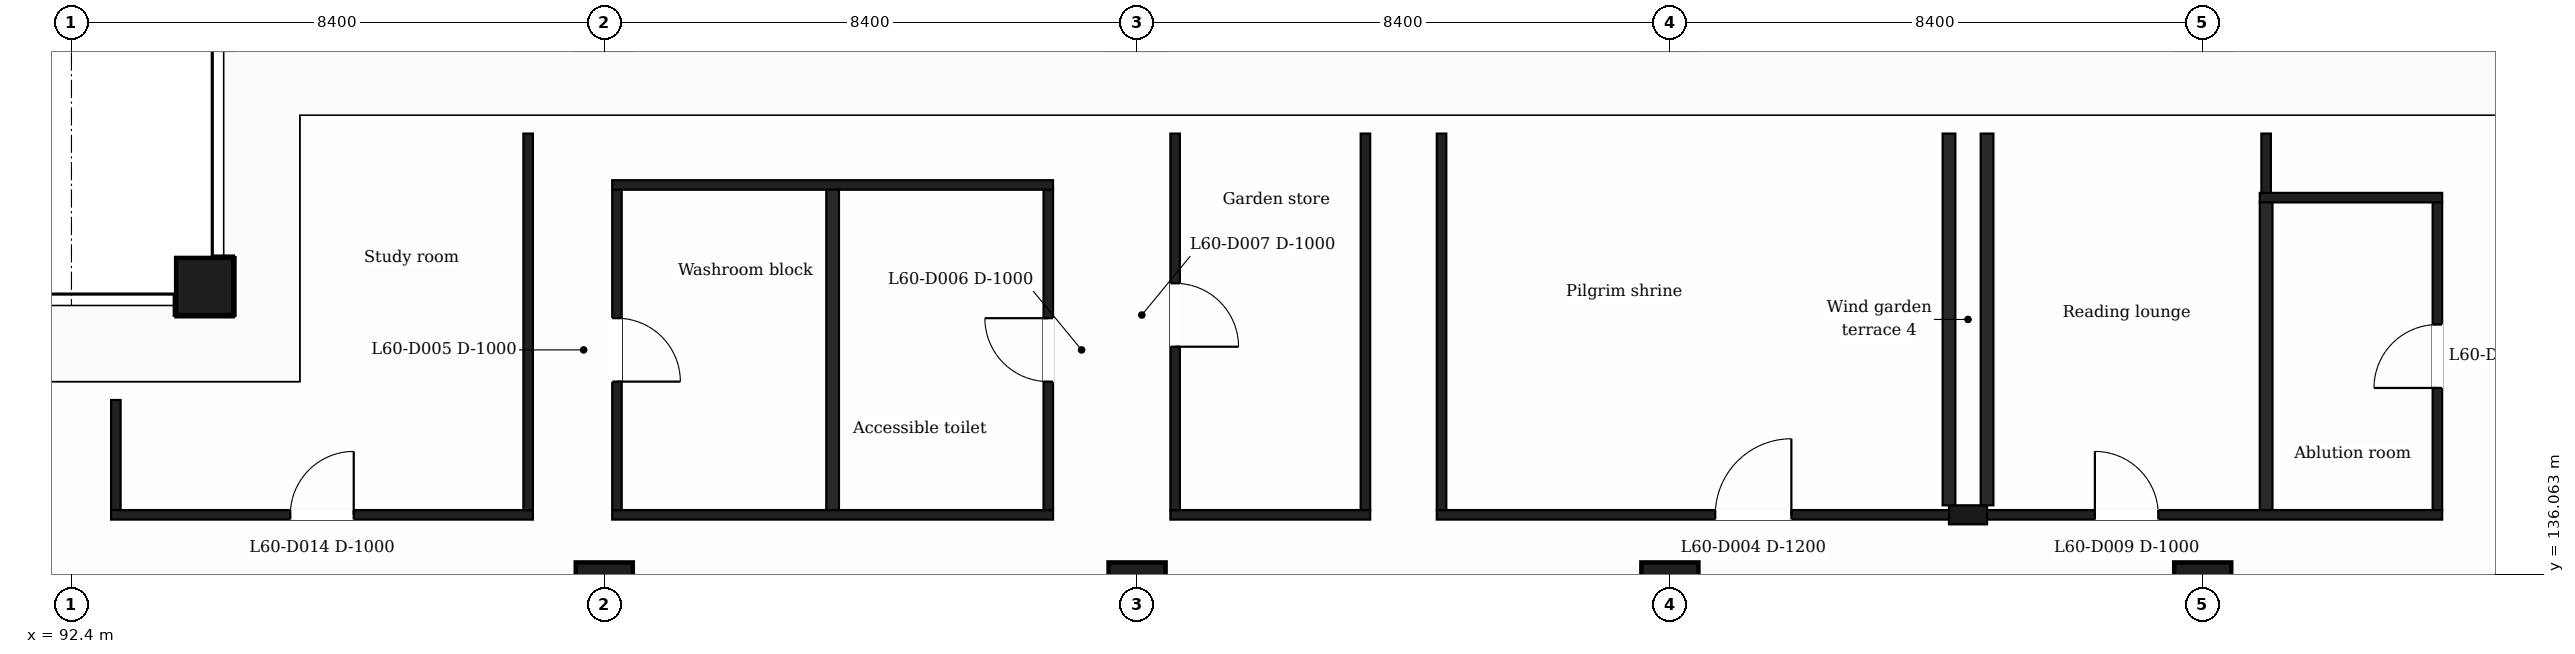
"""IFC4 building model, lengths in metres.
Left out: names, types, materials, properties, quantities, classifications, styles, units other than length and angle.
Written with IfcOpenShell. Run it as: python <this file> out.ifc"""

import sys

from ifc_helpers import new_model, si_unit, direction, frame, frame_2d, origin, origin_2d, place, context, subcontext, project, spatial, rectangle, extrude, element, fill, save


model = new_model("IFC4")
c1 = context("Model", 3, precision=1e-05, world=origin(), true_north=direction((0.0, 1.0)))
c2 = subcontext(c1, "Body", "Model", "MODEL_VIEW")
j1 = project(units=[si_unit("LENGTHUNIT", "METRE"), si_unit("PLANEANGLEUNIT", "RADIAN")], contexts=[c1])
p1 = place(None, origin())
s1 = spatial("IfcSite", under=j1, at=p1, CompositionType="ELEMENT")
p2 = place(p1, origin())
s2 = spatial("IfcBuilding", under=s1, at=p2, CompositionType="ELEMENT")
p3 = place(p2, frame((0.0, 0.0, 246.6)))
s3 = spatial("IfcBuildingStorey", under=s2, at=p3, CompositionType="ELEMENT", Elevation=246.6)
for number, where, z_axis, x_axis in (
    (1, (94.5, 140.6, 0.0), (0.0, 0.0, 1.0), (1.0, 0.0, 0.0)),
    (2, (100.8, 135.8, 0.0), (0.0, 0.0, 1.0), (1.0, 0.0, 0.0)),
    (3, (109.2, 135.8, 0.0), (0.0, 0.0, 1.0), (1.0, 0.0, 0.0)),
    (4, (117.6, 135.8, 0.0), (0.0, 0.0, 1.0), (1.0, 0.0, 0.0)),
    (5, (126.0, 135.8, 0.0), (0.0, 0.0, 1.0), (1.0, 0.0, 0.0)),
):
    element("IfcColumn", number, at=place(p3, frame(where, z_axis=z_axis, x_axis=x_axis)), inside=s3, PredefinedType="COLUMN", context=c2, shape_type="SweptSolid", body=[
        extrude(rectangle(XDim=0.9, YDim=0.9, at=origin_2d()), origin(), (0.0, 0.0, 1.0), 7.4),
    ])
p4 = place(p3, frame((122.0, 137.0, 0.0), z_axis=(0.0, 0.0, 1.0), x_axis=(1.0, 0.0, 0.0)))
e6 = element("IfcWall", 6, at=p4, inside=s3, PredefinedType="PARTITIONING", context=c2, shape_type="SweptSolid", body=[
    extrude(rectangle(XDim=0.6, YDim=0.3, at=frame_2d((0.3, 0.0))), origin(), (0.0, 0.0, 1.0), 1.0),
])
p5 = place(p3, frame((93.025, 137.0, 0.0), z_axis=(0.0, 0.0, 1.0), x_axis=(1.0, 0.0, 0.0)))
e7 = element("IfcWall", 7, at=p5, inside=s3, PredefinedType="PARTITIONING", context=c2, shape_type="SweptSolid", body=[
    extrude(rectangle(XDim=6.65, YDim=0.15, at=frame_2d((3.325, 0.0))), origin(), (0.0, 0.0, 1.0), 6.9),
])
p6 = place(p5, frame((2.825, 0.0, 0.0)))
e8 = element("IfcOpeningElement", 8, at=p6, cuts=e7, PredefinedType="OPENING", context=c2, shape_type="SweptSolid", body=[
    extrude(rectangle(XDim=1.0, YDim=2.1, at=frame_2d((0.5, 1.05))), frame((0.0, 0.085, 0.0), z_axis=(0.0, -1.0, 0.0), x_axis=(1.0, 0.0, 0.0)), (0.0, 0.0, 1.0), 0.17),
])
p7 = place(p3, frame((100.925, 137.0, 0.0), z_axis=(0.0, 0.0, 1.0), x_axis=(1.0, 0.0, 0.0)))
e9 = element("IfcWall", 9, at=p7, inside=s3, PredefinedType="PARTITIONING", context=c2, shape_type="SweptSolid", body=[
    extrude(rectangle(XDim=6.95, YDim=0.15, at=frame_2d((3.475, 0.0))), origin(), (0.0, 0.0, 1.0), 6.9),
])
p8 = place(p3, frame((109.725, 137.0, 0.0), z_axis=(0.0, 0.0, 1.0), x_axis=(1.0, 0.0, 0.0)))
e10 = element("IfcWall", 10, at=p8, inside=s3, PredefinedType="PARTITIONING", context=c2, shape_type="SweptSolid", body=[
    extrude(rectangle(XDim=3.15, YDim=0.15, at=frame_2d((1.575, 0.0))), origin(), (0.0, 0.0, 1.0), 6.9),
])
p9 = place(p3, frame((113.925, 137.0, 0.0), z_axis=(0.0, 0.0, 1.0), x_axis=(1.0, 0.0, 0.0)))
e11 = element("IfcWall", 11, at=p9, inside=s3, PredefinedType="PARTITIONING", context=c2, shape_type="SweptSolid", body=[
    extrude(rectangle(XDim=8.075, YDim=0.15, at=frame_2d((4.038, 0.0))), origin(), (0.0, 0.0, 1.0), 6.9),
])
p10 = place(p9, frame((4.39, 0.0, 0.0)))
e12 = element("IfcOpeningElement", 12, at=p10, cuts=e11, PredefinedType="OPENING", context=c2, shape_type="SweptSolid", body=[
    extrude(rectangle(XDim=1.2, YDim=2.1, at=frame_2d((0.6, 1.05))), frame((0.0, 0.085, 0.0), z_axis=(0.0, -1.0, 0.0), x_axis=(1.0, 0.0, 0.0)), (0.0, 0.0, 1.0), 0.17),
])
p11 = place(p3, frame((122.6, 137.0, 0.0), z_axis=(0.0, 0.0, 1.0), x_axis=(1.0, 0.0, 0.0)))
e13 = element("IfcWall", 13, at=p11, inside=s3, PredefinedType="PARTITIONING", context=c2, shape_type="SweptSolid", body=[
    extrude(rectangle(XDim=7.175, YDim=0.15, at=frame_2d((3.587, 0.0))), origin(), (0.0, 0.0, 1.0), 6.9),
])
p12 = place(p11, frame((1.7, 0.0, 0.0)))
e14 = element("IfcOpeningElement", 14, at=p12, cuts=e13, PredefinedType="OPENING", context=c2, shape_type="SweptSolid", body=[
    extrude(rectangle(XDim=1.0, YDim=2.1, at=frame_2d((0.5, 1.05))), frame((0.0, 0.085, 0.0), z_axis=(0.0, -1.0, 0.0), x_axis=(1.0, 0.0, 0.0)), (0.0, 0.0, 1.0), 0.17),
])
p13 = place(p3, frame((126.9, 142.0, 0.0), z_axis=(0.0, 0.0, 1.0), x_axis=(1.0, 0.0, 0.0)))
e15 = element("IfcWall", 15, at=p13, inside=s3, PredefinedType="PARTITIONING", context=c2, shape_type="SweptSolid", body=[
    extrude(rectangle(XDim=2.875, YDim=0.15, at=frame_2d((1.438, 0.0))), origin(), (0.0, 0.0, 1.0), 6.9),
])
p14 = place(p3, frame((100.925, 142.2, 0.0), z_axis=(0.0, 0.0, 1.0), x_axis=(1.0, 0.0, 0.0)))
e16 = element("IfcWall", 16, at=p14, inside=s3, PredefinedType="PARTITIONING", context=c2, shape_type="SweptSolid", body=[
    extrude(rectangle(XDim=6.95, YDim=0.15, at=frame_2d((3.475, 0.0))), origin(), (0.0, 0.0, 1.0), 6.9),
])
p15 = place(p3, frame((93.1, 137.075, 0.0), z_axis=(0.0, 0.0, 1.0), x_axis=(0.0, 1.0, 0.0)))
e17 = element("IfcWall", 17, at=p15, inside=s3, PredefinedType="PARTITIONING", context=c2, shape_type="SweptSolid", body=[
    extrude(rectangle(XDim=1.735, YDim=0.15, at=frame_2d((0.868, 0.0))), origin(), (0.0, 0.0, 1.0), 6.9),
])
p16 = place(p3, frame((99.6, 137.075, 0.0), z_axis=(0.0, 0.0, 1.0), x_axis=(0.0, 1.0, 0.0)))
e18 = element("IfcWall", 18, at=p16, inside=s3, PredefinedType="PARTITIONING", context=c2, shape_type="SweptSolid", body=[
    extrude(rectangle(XDim=5.935, YDim=0.15, at=frame_2d((2.968, 0.0))), origin(), (0.0, 0.0, 1.0), 6.9),
])
p17 = place(p3, frame((101.0, 137.075, 0.0), z_axis=(0.0, 0.0, 1.0), x_axis=(0.0, 1.0, 0.0)))
e19 = element("IfcWall", 19, at=p17, inside=s3, PredefinedType="PARTITIONING", context=c2, shape_type="SweptSolid", body=[
    extrude(rectangle(XDim=5.05, YDim=0.15, at=frame_2d((2.525, 0.0))), origin(), (0.0, 0.0, 1.0), 6.9),
])
p18 = place(p17, frame((2.025, 0.0, 0.0)))
e20 = element("IfcOpeningElement", 20, at=p18, cuts=e19, PredefinedType="OPENING", context=c2, shape_type="SweptSolid", body=[
    extrude(rectangle(XDim=1.0, YDim=2.1, at=frame_2d((0.5, 1.05))), frame((0.0, 0.085, 0.0), z_axis=(0.0, -1.0, 0.0), x_axis=(1.0, 0.0, 0.0)), (0.0, 0.0, 1.0), 0.17),
])
p19 = place(p3, frame((104.4, 137.075, 0.0), z_axis=(0.0, 0.0, 1.0), x_axis=(0.0, 1.0, 0.0)))
e21 = element("IfcWall", 21, at=p19, inside=s3, PredefinedType="PARTITIONING", context=c2, shape_type="SweptSolid", body=[
    extrude(rectangle(XDim=5.05, YDim=0.2, at=frame_2d((2.525, 0.0))), origin(), (0.0, 0.0, 1.0), 6.9),
])
p20 = place(p3, frame((107.8, 137.075, 0.0), z_axis=(0.0, 0.0, 1.0), x_axis=(0.0, 1.0, 0.0)))
e22 = element("IfcWall", 22, at=p20, inside=s3, PredefinedType="PARTITIONING", context=c2, shape_type="SweptSolid", body=[
    extrude(rectangle(XDim=5.05, YDim=0.15, at=frame_2d((2.525, 0.0))), origin(), (0.0, 0.0, 1.0), 6.9),
])
p21 = place(p20, frame((2.025, 0.0, 0.0)))
e23 = element("IfcOpeningElement", 23, at=p21, cuts=e22, PredefinedType="OPENING", context=c2, shape_type="SweptSolid", body=[
    extrude(rectangle(XDim=1.0, YDim=2.1, at=frame_2d((0.5, 1.05))), frame((0.0, 0.085, 0.0), z_axis=(0.0, -1.0, 0.0), x_axis=(1.0, 0.0, 0.0)), (0.0, 0.0, 1.0), 0.17),
])
p22 = place(p3, frame((109.8, 137.075, 0.0), z_axis=(0.0, 0.0, 1.0), x_axis=(0.0, 1.0, 0.0)))
e24 = element("IfcWall", 24, at=p22, inside=s3, PredefinedType="PARTITIONING", context=c2, shape_type="SweptSolid", body=[
    extrude(rectangle(XDim=5.935, YDim=0.15, at=frame_2d((2.968, 0.0))), origin(), (0.0, 0.0, 1.0), 6.9),
])
p23 = place(p22, frame((2.575, 0.0, 0.0)))
e25 = element("IfcOpeningElement", 25, at=p23, cuts=e24, PredefinedType="OPENING", context=c2, shape_type="SweptSolid", body=[
    extrude(rectangle(XDim=1.0, YDim=2.1, at=frame_2d((0.5, 1.05))), frame((0.0, 0.085, 0.0), z_axis=(0.0, -1.0, 0.0), x_axis=(1.0, 0.0, 0.0)), (0.0, 0.0, 1.0), 0.17),
])
for number, where, z_axis, x_axis in (
    (26, (112.8, 137.075, 0.0), (0.0, 0.0, 1.0), (0.0, 1.0, 0.0)),
    (27, (114.0, 137.075, 0.0), (0.0, 0.0, 1.0), (0.0, 1.0, 0.0)),
):
    element("IfcWall", number, at=place(p3, frame(where, z_axis=z_axis, x_axis=x_axis)), inside=s3, PredefinedType="PARTITIONING", context=c2, shape_type="SweptSolid", body=[
        extrude(rectangle(XDim=5.935, YDim=0.15, at=frame_2d((2.968, 0.0))), origin(), (0.0, 0.0, 1.0), 6.9),
    ])
for number, where, z_axis, x_axis in (
    (28, (122.0, 137.15, 0.0), (0.0, 0.0, 1.0), (0.0, 1.0, 0.0)),
    (29, (122.6, 137.15, 0.0), (0.0, 0.0, 1.0), (0.0, 1.0, 0.0)),
):
    element("IfcWall", number, at=place(p3, frame(where, z_axis=z_axis, x_axis=x_axis)), inside=s3, PredefinedType="PARTITIONING", context=c2, shape_type="SweptSolid", body=[
        extrude(rectangle(XDim=5.86, YDim=0.2, at=frame_2d((2.93, 0.0))), origin(), (0.0, 0.0, 1.0), 6.9),
    ])
p24 = place(p3, frame((127.0, 137.075, 0.0), z_axis=(0.0, 0.0, 1.0), x_axis=(0.0, 1.0, 0.0)))
e30 = element("IfcWall", 30, at=p24, inside=s3, PredefinedType="PARTITIONING", context=c2, shape_type="SweptSolid", body=[
    extrude(rectangle(XDim=4.85, YDim=0.2, at=frame_2d((2.425, 0.0))), origin(), (0.0, 0.0, 1.0), 6.9),
])
p25 = place(p3, frame((127.0, 142.075, 0.0), z_axis=(0.0, 0.0, 1.0), x_axis=(0.0, 1.0, 0.0)))
e31 = element("IfcWall", 31, at=p25, inside=s3, PredefinedType="PARTITIONING", context=c2, shape_type="SweptSolid", body=[
    extrude(rectangle(XDim=0.935, YDim=0.15, at=frame_2d((0.468, 0.0))), origin(), (0.0, 0.0, 1.0), 6.9),
])
p26 = place(p3, frame((129.7, 137.075, 0.0), z_axis=(0.0, 0.0, 1.0), x_axis=(0.0, 1.0, 0.0)))
e32 = element("IfcWall", 32, at=p26, inside=s3, PredefinedType="PARTITIONING", context=c2, shape_type="SweptSolid", body=[
    extrude(rectangle(XDim=4.85, YDim=0.15, at=frame_2d((2.425, 0.0))), origin(), (0.0, 0.0, 1.0), 6.9),
])
p27 = place(p26, frame((1.925, 0.0, 0.0)))
e33 = element("IfcOpeningElement", 33, at=p27, cuts=e32, PredefinedType="OPENING", context=c2, shape_type="SweptSolid", body=[
    extrude(rectangle(XDim=1.0, YDim=2.1, at=frame_2d((0.5, 1.05))), frame((0.0, 0.085, 0.0), z_axis=(0.0, -1.0, 0.0), x_axis=(1.0, 0.0, 0.0)), (0.0, 0.0, 1.0), 0.17),
])
p28 = place(p10, origin())
e34 = element("IfcDoor", 34, at=p28, inside=s3, OperationType="SINGLE_SWING_RIGHT", PredefinedType="DOOR", context=c2, shape_type="SweptSolid", body=[
    extrude(rectangle(XDim=1.2, YDim=2.1, at=frame_2d((0.6, 1.05))), frame((0.0, 0.025, 0.0), z_axis=(0.0, -1.0, 0.0), x_axis=(1.0, 0.0, 0.0)), (0.0, 0.0, 1.0), 0.05),
])
fill(e12, e34)
p29 = place(p18, origin())
e35 = element("IfcDoor", 35, at=p29, inside=s3, OperationType="SINGLE_SWING_LEFT", PredefinedType="DOOR", context=c2, shape_type="SweptSolid", body=[
    extrude(rectangle(XDim=1.0, YDim=2.1, at=frame_2d((0.5, 1.05))), frame((0.0, 0.025, 0.0), z_axis=(0.0, -1.0, 0.0), x_axis=(1.0, 0.0, 0.0)), (0.0, 0.0, 1.0), 0.05),
])
fill(e20, e35)
p30 = place(p21, origin())
e36 = element("IfcDoor", 36, at=p30, inside=s3, OperationType="SINGLE_SWING_RIGHT", PredefinedType="DOOR", context=c2, shape_type="SweptSolid", body=[
    extrude(rectangle(XDim=1.0, YDim=2.1, at=frame_2d((0.5, 1.05))), frame((0.0, 0.025, 0.0), z_axis=(0.0, -1.0, 0.0), x_axis=(1.0, 0.0, 0.0)), (0.0, 0.0, 1.0), 0.05),
])
fill(e23, e36)
p31 = place(p23, origin())
e37 = element("IfcDoor", 37, at=p31, inside=s3, OperationType="SINGLE_SWING_LEFT", PredefinedType="DOOR", context=c2, shape_type="SweptSolid", body=[
    extrude(rectangle(XDim=1.0, YDim=2.1, at=frame_2d((0.5, 1.05))), frame((0.0, 0.025, 0.0), z_axis=(0.0, -1.0, 0.0), x_axis=(1.0, 0.0, 0.0)), (0.0, 0.0, 1.0), 0.05),
])
fill(e25, e37)
p32 = place(p12, origin())
e38 = element("IfcDoor", 38, at=p32, inside=s3, OperationType="SINGLE_SWING_LEFT", PredefinedType="DOOR", context=c2, shape_type="SweptSolid", body=[
    extrude(rectangle(XDim=1.0, YDim=2.1, at=frame_2d((0.5, 1.05))), frame((0.0, 0.025, 0.0), z_axis=(0.0, -1.0, 0.0), x_axis=(1.0, 0.0, 0.0)), (0.0, 0.0, 1.0), 0.05),
])
fill(e14, e38)
p33 = place(p6, origin())
e39 = element("IfcDoor", 39, at=p33, inside=s3, OperationType="SINGLE_SWING_RIGHT", PredefinedType="DOOR", context=c2, shape_type="SweptSolid", body=[
    extrude(rectangle(XDim=1.0, YDim=2.1, at=frame_2d((0.5, 1.05))), frame((0.0, 0.025, 0.0), z_axis=(0.0, -1.0, 0.0), x_axis=(1.0, 0.0, 0.0)), (0.0, 0.0, 1.0), 0.05),
])
fill(e8, e39)
p34 = place(p27, origin())
e40 = element("IfcDoor", 40, at=p34, inside=s3, OperationType="SINGLE_SWING_LEFT", PredefinedType="DOOR", context=c2, shape_type="SweptSolid", body=[
    extrude(rectangle(XDim=1.0, YDim=2.1, at=frame_2d((0.5, 1.05))), frame((0.0, 0.025, 0.0), z_axis=(0.0, -1.0, 0.0), x_axis=(1.0, 0.0, 0.0)), (0.0, 0.0, 1.0), 0.05),
])
fill(e33, e40)
save(model, sys.argv[1])
